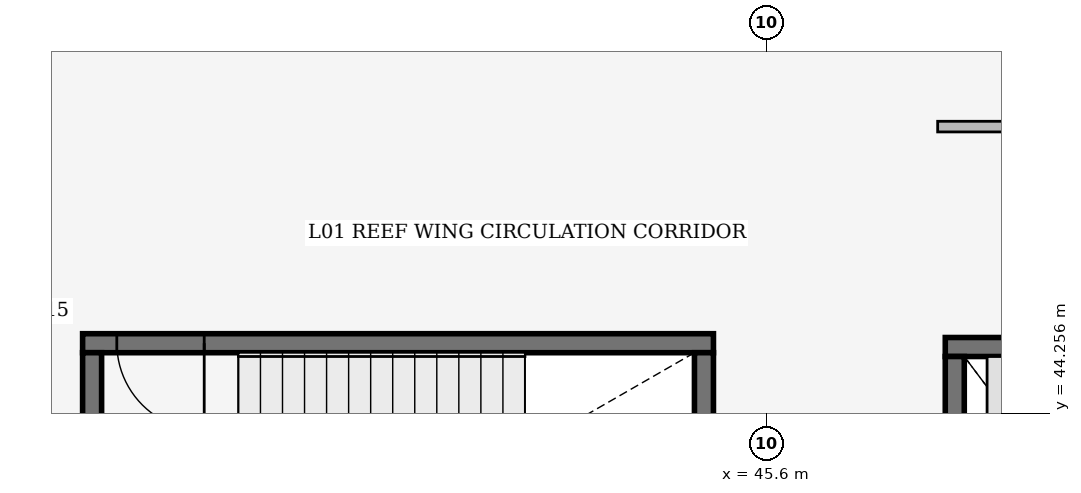
"""IFC4 building model, lengths in metres.
Left out: names, types, materials, properties, quantities, classifications, styles, units other than length and angle.
Written with IfcOpenShell. Run it as: python <this file> out.ifc"""

import sys

from ifc_helpers import new_model, si_unit, direction, frame, frame_2d, origin, place, context, subcontext, project, spatial, rectangle, extrude, element, fill, save


model = new_model("IFC4")
c1 = context("Model", 3, precision=1e-05, world=origin(), true_north=direction((0.0, 1.0)))
c2 = subcontext(c1, "Body", "Model", "MODEL_VIEW")
j1 = project(units=[si_unit("LENGTHUNIT", "METRE"), si_unit("PLANEANGLEUNIT", "RADIAN")], contexts=[c1])
p1 = place(None, origin())
s1 = spatial("IfcSite", under=j1, at=p1, CompositionType="ELEMENT")
p2 = place(p1, origin())
s2 = spatial("IfcBuilding", under=s1, at=p2, CompositionType="ELEMENT")
p3 = place(p2, frame((0.0, 0.0, 5.4)))
s3 = spatial("IfcBuildingStorey", under=s2, at=p3, CompositionType="ELEMENT", Elevation=5.4)
p4 = place(p3, frame((44.9, 45.175, 0.0), z_axis=(0.0, 0.0, 1.0), x_axis=(-1.0, 0.0, 0.0)))
e1 = element("IfcWall", 1, at=p4, inside=s3, PredefinedType="SHEAR", context=c2, shape_type="SweptSolid", body=[
    extrude(rectangle(XDim=8.3, YDim=0.25, at=frame_2d((4.15, 0.0))), origin(), (0.0, 0.0, 1.0), 4.8),
])
p5 = place(p4, frame((7.85, 0.0, 0.0), z_axis=(0.0, 0.0, 1.0), x_axis=(-1.0, 0.0, 0.0)))
e2 = element("IfcOpeningElement", 2, at=p5, cuts=e1, PredefinedType="OPENING", context=c2, shape_type="SweptSolid", body=[
    extrude(rectangle(XDim=1.15, YDim=2.2, at=frame_2d((0.575, 1.1))), frame((0.0, 0.135, 0.0), z_axis=(0.0, -1.0, 0.0), x_axis=(1.0, 0.0, 0.0)), (0.0, 0.0, 1.0), 0.27),
])
for number, where, z_axis, x_axis in (
    (3, (36.725, 45.05, 0.0), (0.0, 0.0, 1.0), (0.0, -1.0, 0.0)),
    (4, (44.775, 41.6, 0.0), (0.0, 0.0, 1.0), (0.0, 1.0, 0.0)),
):
    element("IfcWall", number, at=place(p3, frame(where, z_axis=z_axis, x_axis=x_axis)), inside=s3, PredefinedType="SHEAR", context=c2, shape_type="SweptSolid", body=[
        extrude(rectangle(XDim=3.45, YDim=0.25, at=frame_2d((1.725, 0.0))), origin(), (0.0, 0.0, 1.0), 4.8),
    ])
p6 = place(p3, frame((47.95, 45.125, 0.0), z_axis=(0.0, 0.0, 1.0), x_axis=(1.0, 0.0, 0.0)))
e5 = element("IfcWall", 5, at=p6, inside=s3, PredefinedType="SHEAR", context=c2, shape_type="SweptSolid", body=[
    extrude(rectangle(XDim=2.75, YDim=0.25, at=frame_2d((1.375, 0.0))), origin(), (0.0, 0.0, 1.0), 4.8),
])
p7 = place(p6, frame((0.825, 0.0, 0.0)))
e6 = element("IfcOpeningElement", 6, at=p7, cuts=e5, PredefinedType="OPENING", context=c2, shape_type="SweptSolid", body=[
    extrude(rectangle(XDim=1.1, YDim=2.2, at=frame_2d((0.55, 1.1))), frame((0.0, 0.135, 0.0), z_axis=(0.0, -1.0, 0.0), x_axis=(1.0, 0.0, 0.0)), (0.0, 0.0, 1.0), 0.27),
])
p8 = place(p3, frame((48.075, 42.0, 0.0), z_axis=(0.0, 0.0, 1.0), x_axis=(0.0, 1.0, 0.0)))
e7 = element("IfcWall", 7, at=p8, inside=s3, PredefinedType="SHEAR", context=c2, shape_type="SweptSolid", body=[
    extrude(rectangle(XDim=3.0, YDim=0.25, at=frame_2d((1.5, 0.0))), origin(), (0.0, 0.0, 1.0), 4.8),
])
p9 = place(p3, frame((47.85, 48.025, 0.0), z_axis=(0.0, 0.0, 1.0), x_axis=(1.0, 0.0, 0.0)))
e8 = element("IfcWall", 8, at=p9, inside=s3, PredefinedType="PARTITIONING", context=c2, shape_type="SweptSolid", body=[
    extrude(rectangle(XDim=3.15, YDim=0.14, at=frame_2d((1.575, 0.0))), origin(), (0.0, 0.0, 1.0), 4.456),
])
p10 = place(p9, frame((0.905, 0.0, 0.0)))
e9 = element("IfcOpeningElement", 9, at=p10, cuts=e8, PredefinedType="OPENING", context=c2, shape_type="SweptSolid", body=[
    extrude(rectangle(XDim=1.34, YDim=2.28, at=frame_2d((0.67, 1.14))), frame((0.0, 0.08, 0.0), z_axis=(0.0, -1.0, 0.0), x_axis=(1.0, 0.0, 0.0)), (0.0, 0.0, 1.0), 0.16),
])
p11 = place(p5, origin())
e10 = element("IfcDoor", 10, at=p11, inside=s3, OperationType="SINGLE_SWING_RIGHT", PredefinedType="DOOR", context=c2, shape_type="SweptSolid", body=[
    extrude(rectangle(XDim=1.15, YDim=2.2, at=frame_2d((0.575, 1.1))), frame((0.0, 0.025, 0.0), z_axis=(0.0, -1.0, 0.0), x_axis=(1.0, 0.0, 0.0)), (0.0, 0.0, 1.0), 0.05),
])
fill(e2, e10)
save(model, sys.argv[1])
